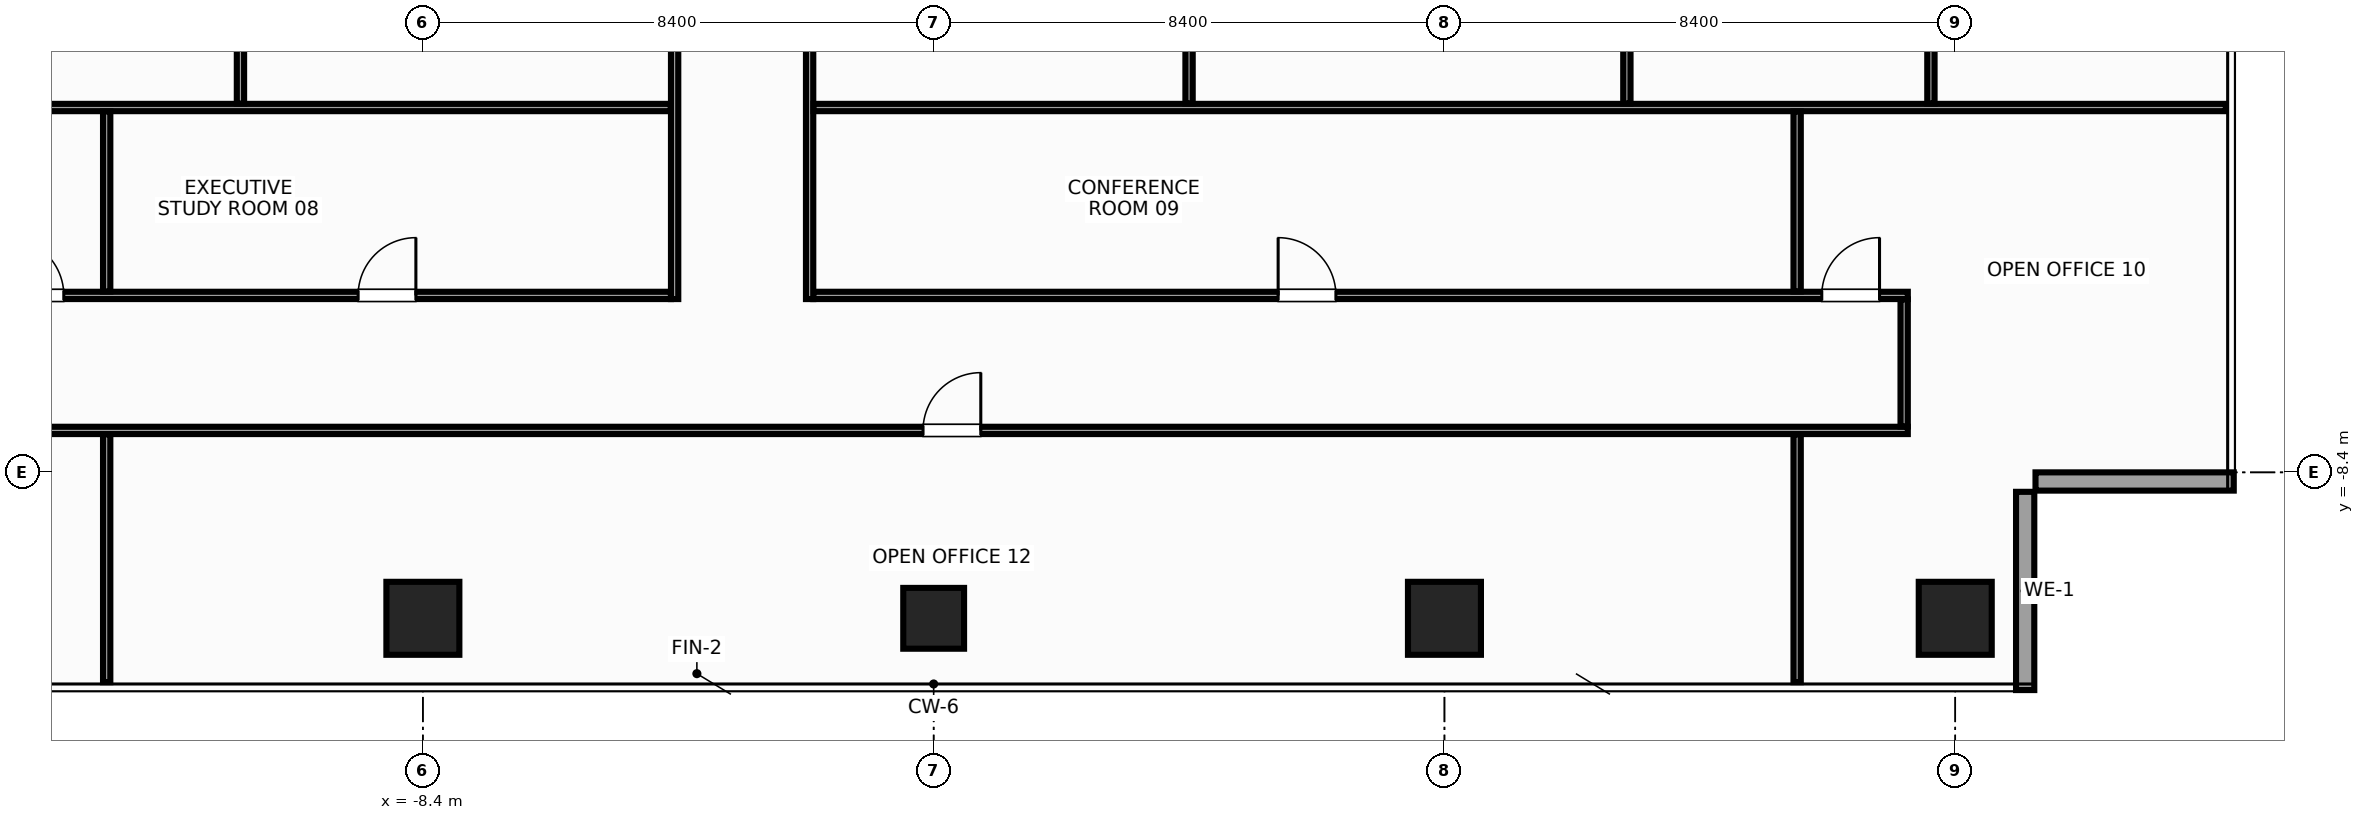
"""IFC4 building model, lengths in metres.
Left out: names, types, materials, properties, quantities, classifications, styles, units other than length and angle.
Written with IfcOpenShell. Run it as: python <this file> out.ifc"""

import sys

from ifc_helpers import new_model, si_unit, direction, frame, frame_2d, origin, origin_2d, place, context, subcontext, project, spatial, rectangle, extrude, source, transform, mapped, element, fill, save


model = new_model("IFC4")
c1 = context("Model", 3, precision=1e-05, world=origin(), true_north=direction((0.0, 1.0)))
c2 = subcontext(c1, "Body", "Model", "MODEL_VIEW")
j1 = project(units=[si_unit("LENGTHUNIT", "METRE"), si_unit("PLANEANGLEUNIT", "RADIAN")], contexts=[c1])
p1 = place(None, origin())
s1 = spatial("IfcSite", under=j1, at=p1, CompositionType="ELEMENT")
p2 = place(p1, origin())
s2 = spatial("IfcBuilding", under=s1, at=p2, CompositionType="ELEMENT")
p3 = place(p2, frame((0.0, 0.0, 275.6)))
s3 = spatial("IfcBuildingStorey", under=s2, at=p3, CompositionType="ELEMENT", Elevation=275.6)
m1 = source(origin(), c2, "Body", "SweptSolid", [
    extrude(rectangle(XDim=1.2, YDim=1.2, at=origin_2d()), origin(), (0.0, 0.0, 1.0), 3.6),
])
for number, where, z_axis, x_axis in (
    (1, (16.8, -10.8, 0.0), (0.0, 0.0, 1.0), (1.0, 0.0, 0.0)),
    (2, (-8.4, -10.8, 0.0), (0.0, 0.0, 1.0), (1.0, 0.0, 0.0)),
    (3, (8.4, -10.8, 0.0), (0.0, 0.0, 1.0), (1.0, 0.0, 0.0)),
):
    element("IfcColumn", number, at=place(p3, frame(where, z_axis=z_axis, x_axis=x_axis)), inside=s3, PredefinedType="COLUMN", context=c2, shape_type="MappedRepresentation", body=[
        mapped(m1, transform((0.0, 0.0, 0.0), x_axis=(1.0, 0.0, 0.0), y_axis=(0.0, 1.0, 0.0), z_axis=(0.0, 0.0, 1.0), scale=1.0)),
    ])
m2 = source(origin(), c2, "Body", "SweptSolid", [
    extrude(rectangle(XDim=1.0, YDim=1.0, at=origin_2d()), origin(), (0.0, 0.0, 1.0), 3.6),
])
p4 = place(p3, frame((0.0, -10.8, 0.0), z_axis=(0.0, 0.0, 1.0), x_axis=(1.0, 0.0, 0.0)))
e4 = element("IfcColumn", 4, at=p4, inside=s3, PredefinedType="COLUMN", context=c2, shape_type="MappedRepresentation", body=[
    mapped(m2, transform((0.0, 0.0, 0.0), x_axis=(1.0, 0.0, 0.0), y_axis=(0.0, 1.0, 0.0), z_axis=(0.0, 0.0, 1.0), scale=1.0)),
])
m3 = source(origin(), c2, "Body", "SweptSolid", [
    extrude(rectangle(XDim=3.26, YDim=0.3, at=frame_2d((1.63, 0.0))), origin(), (0.0, 0.0, 1.0), 2.75),
])
p5 = place(p3, frame((17.95, -11.98, 0.0), z_axis=(0.0, 0.0, 1.0), x_axis=(0.0, 1.0, 0.0)))
e5 = element("IfcWall", 5, at=p5, inside=s3, PredefinedType="STANDARD", context=c2, shape_type="MappedRepresentation", body=[
    mapped(m3, transform((0.0, 0.0, 0.0), x_axis=(1.0, 0.0, 0.0), y_axis=(0.0, 1.0, 0.0), z_axis=(0.0, 0.0, 1.0), scale=1.0)),
])
m4 = source(origin(), c2, "Body", "SweptSolid", [
    extrude(rectangle(XDim=3.26, YDim=0.3, at=frame_2d((1.63, 0.0))), origin(), (0.0, 0.0, 1.0), 2.75),
])
p6 = place(p3, frame((18.12, -8.55, 0.0), z_axis=(0.0, 0.0, 1.0), x_axis=(1.0, 0.0, 0.0)))
e6 = element("IfcWall", 6, at=p6, inside=s3, PredefinedType="STANDARD", context=c2, shape_type="MappedRepresentation", body=[
    mapped(m4, transform((0.0, 0.0, 0.0), x_axis=(1.0, 0.0, 0.0), y_axis=(0.0, 1.0, 0.0), z_axis=(0.0, 0.0, 1.0), scale=1.0)),
])
m5 = source(origin(), c2, "Body", "SweptSolid", [
    extrude(rectangle(XDim=11.7, YDim=0.12, at=frame_2d((5.85, 0.0))), origin(), (0.0, 0.0, 1.0), 2.755),
])
p7 = place(p3, frame((-16.02, -5.49, 0.0), z_axis=(0.0, 0.0, 1.0), x_axis=(1.0, 0.0, 0.0)))
e7 = element("IfcWall", 7, at=p7, inside=s3, PredefinedType="PARTITIONING", context=c2, shape_type="MappedRepresentation", body=[
    mapped(m5, transform((0.0, 0.0, 0.0), x_axis=(1.0, 0.0, 0.0), y_axis=(0.0, 1.0, 0.0), z_axis=(0.0, 0.0, 1.0), scale=1.0)),
])
p8 = place(p7, frame((6.555, 0.0, 0.0)))
e8 = element("IfcOpeningElement", 8, at=p8, cuts=e7, PredefinedType="OPENING", context=c2, shape_type="SweptSolid", body=[
    extrude(rectangle(XDim=0.95, YDim=2.15, at=frame_2d((0.475, 1.075))), frame((0.0, 0.072, 0.0), z_axis=(0.0, -1.0, 0.0), x_axis=(1.0, 0.0, 0.0)), (0.0, 0.0, 1.0), 0.144),
])
p9 = place(p7, frame((0.765, 0.0, 0.0)))
e9 = element("IfcOpeningElement", 9, at=p9, cuts=e7, PredefinedType="OPENING", context=c2, shape_type="SweptSolid", body=[
    extrude(rectangle(XDim=0.95, YDim=2.15, at=frame_2d((0.475, 1.075))), frame((0.0, 0.072, 0.0), z_axis=(0.0, -1.0, 0.0), x_axis=(1.0, 0.0, 0.0)), (0.0, 0.0, 1.0), 0.144),
])
m6 = source(origin(), c2, "Body", "SweptSolid", [
    extrude(rectangle(XDim=18.0, YDim=0.12, at=frame_2d((9.0, 0.0))), origin(), (0.0, 0.0, 1.0), 2.755),
])
p10 = place(p3, frame((-1.98, -5.49, 0.0), z_axis=(0.0, 0.0, 1.0), x_axis=(1.0, 0.0, 0.0)))
e10 = element("IfcWall", 10, at=p10, inside=s3, PredefinedType="PARTITIONING", context=c2, shape_type="MappedRepresentation", body=[
    mapped(m6, transform((0.0, 0.0, 0.0), x_axis=(1.0, 0.0, 0.0), y_axis=(0.0, 1.0, 0.0), z_axis=(0.0, 0.0, 1.0), scale=1.0)),
])
p11 = place(p10, frame((7.645, 0.0, 0.0)))
e11 = element("IfcOpeningElement", 11, at=p11, cuts=e10, PredefinedType="OPENING", context=c2, shape_type="SweptSolid", body=[
    extrude(rectangle(XDim=0.95, YDim=2.15, at=frame_2d((0.475, 1.075))), frame((0.0, 0.072, 0.0), z_axis=(0.0, -1.0, 0.0), x_axis=(1.0, 0.0, 0.0)), (0.0, 0.0, 1.0), 0.144),
])
p12 = place(p10, frame((16.585, 0.0, 0.0)))
e12 = element("IfcOpeningElement", 12, at=p12, cuts=e10, PredefinedType="OPENING", context=c2, shape_type="SweptSolid", body=[
    extrude(rectangle(XDim=0.95, YDim=2.15, at=frame_2d((0.475, 1.075))), frame((0.0, 0.072, 0.0), z_axis=(0.0, -1.0, 0.0), x_axis=(1.0, 0.0, 0.0)), (0.0, 0.0, 1.0), 0.144),
])
m7 = source(origin(), c2, "Body", "SweptSolid", [
    extrude(rectangle(XDim=32.04, YDim=0.12, at=frame_2d((16.02, 0.0))), origin(), (0.0, 0.0, 1.0), 2.755),
])
p13 = place(p3, frame((-16.02, -7.71, 0.0), z_axis=(0.0, 0.0, 1.0), x_axis=(1.0, 0.0, 0.0)))
e13 = element("IfcWall", 13, at=p13, inside=s3, PredefinedType="PARTITIONING", context=c2, shape_type="MappedRepresentation", body=[
    mapped(m7, transform((0.0, 0.0, 0.0), x_axis=(1.0, 0.0, 0.0), y_axis=(0.0, 1.0, 0.0), z_axis=(0.0, 0.0, 1.0), scale=1.0)),
])
p14 = place(p13, frame((15.845, 0.0, 0.0)))
e14 = element("IfcOpeningElement", 14, at=p14, cuts=e13, PredefinedType="OPENING", context=c2, shape_type="SweptSolid", body=[
    extrude(rectangle(XDim=0.95, YDim=2.15, at=frame_2d((0.475, 1.075))), frame((0.0, 0.072, 0.0), z_axis=(0.0, -1.0, 0.0), x_axis=(1.0, 0.0, 0.0)), (0.0, 0.0, 1.0), 0.144),
])
m8 = source(origin(), c2, "Body", "SweptSolid", [
    extrude(rectangle(XDim=13.35, YDim=0.12, at=frame_2d((6.675, 0.0))), origin(), (0.0, 0.0, 1.0), 2.655),
])
for number, where, z_axis, x_axis in (
    (15, (-4.26, -5.55, 0.0), (0.0, 0.0, 1.0), (0.0, 1.0, 0.0)),
    (16, (-2.04, -5.55, 0.0), (0.0, 0.0, 1.0), (0.0, 1.0, 0.0)),
):
    element("IfcWall", number, at=place(p3, frame(where, z_axis=z_axis, x_axis=x_axis)), inside=s3, PredefinedType="PARTITIONING", context=c2, shape_type="MappedRepresentation", body=[
        mapped(m8, transform((0.0, 0.0, 0.0), x_axis=(1.0, 0.0, 0.0), y_axis=(0.0, 1.0, 0.0), z_axis=(0.0, 0.0, 1.0), scale=1.0)),
    ])
m9 = source(origin(), c2, "Body", "SweptSolid", [
    extrude(rectangle(XDim=2.09, YDim=0.12, at=frame_2d((1.045, 0.0))), origin(), (0.0, 0.0, 1.0), 3.37),
])
p15 = place(p3, frame((15.96, -7.645, 0.0), z_axis=(0.0, 0.0, 1.0), x_axis=(0.0, 1.0, 0.0)))
e17 = element("IfcWall", 17, at=p15, inside=s3, PredefinedType="PARTITIONING", context=c2, shape_type="MappedRepresentation", body=[
    mapped(m9, transform((0.0, 0.0, 0.0), x_axis=(1.0, 0.0, 0.0), y_axis=(0.0, 1.0, 0.0), z_axis=(0.0, 0.0, 1.0), scale=1.0)),
])
m10 = source(origin(), c2, "Body", "SweptSolid", [
    extrude(rectangle(XDim=16.925, YDim=0.12, at=frame_2d((8.462, 0.0))), origin(), (0.0, 0.0, 1.0), 2.755),
])
p16 = place(p3, frame((-21.25, -2.4, 0.0), z_axis=(0.0, 0.0, 1.0), x_axis=(1.0, 0.0, 0.0)))
e18 = element("IfcWall", 18, at=p16, inside=s3, PredefinedType="PARTITIONING", context=c2, shape_type="MappedRepresentation", body=[
    mapped(m10, transform((0.0, 0.0, 0.0), x_axis=(1.0, 0.0, 0.0), y_axis=(0.0, 1.0, 0.0), z_axis=(0.0, 0.0, 1.0), scale=1.0)),
])
m11 = source(origin(), c2, "Body", "SweptSolid", [
    extrude(rectangle(XDim=23.225, YDim=0.12, at=frame_2d((11.613, 0.0))), origin(), (0.0, 0.0, 1.0), 2.755),
])
p17 = place(p3, frame((-1.975, -2.4, 0.0), z_axis=(0.0, 0.0, 1.0), x_axis=(1.0, 0.0, 0.0)))
e19 = element("IfcWall", 19, at=p17, inside=s3, PredefinedType="PARTITIONING", context=c2, shape_type="MappedRepresentation", body=[
    mapped(m11, transform((0.0, 0.0, 0.0), x_axis=(1.0, 0.0, 0.0), y_axis=(0.0, 1.0, 0.0), z_axis=(0.0, 0.0, 1.0), scale=1.0)),
])
m12 = source(origin(), c2, "Body", "SweptSolid", [
    extrude(rectangle(XDim=10.01, YDim=0.12, at=frame_2d((5.005, 0.0))), origin(), (0.0, 0.0, 1.0), 2.655),
])
for number, where, z_axis, x_axis in (
    (20, (-11.4, -2.335, 0.0), (0.0, 0.0, 1.0), (0.0, 1.0, 0.0)),
    (21, (4.2, -2.335, 0.0), (0.0, 0.0, 1.0), (0.0, 1.0, 0.0)),
    (22, (11.4, -2.335, 0.0), (0.0, 0.0, 1.0), (0.0, 1.0, 0.0)),
):
    element("IfcWall", number, at=place(p3, frame(where, z_axis=z_axis, x_axis=x_axis)), inside=s3, PredefinedType="PARTITIONING", context=c2, shape_type="MappedRepresentation", body=[
        mapped(m12, transform((0.0, 0.0, 0.0), x_axis=(1.0, 0.0, 0.0), y_axis=(0.0, 1.0, 0.0), z_axis=(0.0, 0.0, 1.0), scale=1.0)),
    ])
m13 = source(origin(), c2, "Body", "SweptSolid", [
    extrude(rectangle(XDim=1.725, YDim=0.12, at=frame_2d((0.862, 0.0))), origin(), (0.0, 0.0, 1.0), 3.37),
])
p18 = place(p3, frame((16.4, -2.335, 0.0), z_axis=(0.0, 0.0, 1.0), x_axis=(0.0, 1.0, 0.0)))
e23 = element("IfcWall", 23, at=p18, inside=s3, PredefinedType="PARTITIONING", context=c2, shape_type="MappedRepresentation", body=[
    mapped(m13, transform((0.0, 0.0, 0.0), x_axis=(1.0, 0.0, 0.0), y_axis=(0.0, 1.0, 0.0), z_axis=(0.0, 0.0, 1.0), scale=1.0)),
])
m14 = source(origin(), c2, "Body", "SweptSolid", [
    extrude(rectangle(XDim=4.075, YDim=0.12, at=frame_2d((2.038, 0.0))), origin(), (0.0, 0.0, 1.0), 2.905),
])
p19 = place(p3, frame((-13.6, -11.85, 0.0), z_axis=(0.0, 0.0, 1.0), x_axis=(0.0, 1.0, 0.0)))
e24 = element("IfcWall", 24, at=p19, inside=s3, PredefinedType="PARTITIONING", context=c2, shape_type="MappedRepresentation", body=[
    mapped(m14, transform((0.0, 0.0, 0.0), x_axis=(1.0, 0.0, 0.0), y_axis=(0.0, 1.0, 0.0), z_axis=(0.0, 0.0, 1.0), scale=1.0)),
])
m15 = source(origin(), c2, "Body", "SweptSolid", [
    extrude(rectangle(XDim=2.96, YDim=0.12, at=frame_2d((1.48, 0.0))), origin(), (0.0, 0.0, 1.0), 3.37),
])
p20 = place(p3, frame((-13.6, -5.425, 0.0), z_axis=(0.0, 0.0, 1.0), x_axis=(0.0, 1.0, 0.0)))
e25 = element("IfcWall", 25, at=p20, inside=s3, PredefinedType="PARTITIONING", context=c2, shape_type="MappedRepresentation", body=[
    mapped(m15, transform((0.0, 0.0, 0.0), x_axis=(1.0, 0.0, 0.0), y_axis=(0.0, 1.0, 0.0), z_axis=(0.0, 0.0, 1.0), scale=1.0)),
])
p21 = place(p3, frame((14.2, -11.85, 0.0), z_axis=(0.0, 0.0, 1.0), x_axis=(0.0, 1.0, 0.0)))
e26 = element("IfcWall", 26, at=p21, inside=s3, PredefinedType="PARTITIONING", context=c2, shape_type="MappedRepresentation", body=[
    mapped(m14, transform((0.0, 0.0, 0.0), x_axis=(1.0, 0.0, 0.0), y_axis=(0.0, 1.0, 0.0), z_axis=(0.0, 0.0, 1.0), scale=1.0)),
])
p22 = place(p3, frame((14.2, -5.425, 0.0), z_axis=(0.0, 0.0, 1.0), x_axis=(0.0, 1.0, 0.0)))
e27 = element("IfcWall", 27, at=p22, inside=s3, PredefinedType="PARTITIONING", context=c2, shape_type="MappedRepresentation", body=[
    mapped(m15, transform((0.0, 0.0, 0.0), x_axis=(1.0, 0.0, 0.0), y_axis=(0.0, 1.0, 0.0), z_axis=(0.0, 0.0, 1.0), scale=1.0)),
])
m16 = source(origin(), c2, "Body", "SweptSolid", [
    extrude(rectangle(XDim=0.95, YDim=2.15, at=frame_2d((0.475, 1.075))), frame((0.0, 0.025, 0.0), z_axis=(0.0, -1.0, 0.0), x_axis=(1.0, 0.0, 0.0)), (0.0, 0.0, 1.0), 0.05),
])
p23 = place(p8, origin())
e28 = element("IfcDoor", 28, at=p23, inside=s3, OperationType="SINGLE_SWING_RIGHT", PredefinedType="DOOR", context=c2, shape_type="MappedRepresentation", body=[
    mapped(m16, transform((0.0, 0.0, 0.0), x_axis=(1.0, 0.0, 0.0), y_axis=(0.0, 1.0, 0.0), z_axis=(0.0, 0.0, 1.0), scale=1.0)),
])
fill(e8, e28)
p24 = place(p11, origin())
e29 = element("IfcDoor", 29, at=p24, inside=s3, OperationType="SINGLE_SWING_LEFT", PredefinedType="DOOR", context=c2, shape_type="MappedRepresentation", body=[
    mapped(m16, transform((0.0, 0.0, 0.0), x_axis=(1.0, 0.0, 0.0), y_axis=(0.0, 1.0, 0.0), z_axis=(0.0, 0.0, 1.0), scale=1.0)),
])
fill(e11, e29)
p25 = place(p12, origin())
e30 = element("IfcDoor", 30, at=p25, inside=s3, OperationType="SINGLE_SWING_RIGHT", PredefinedType="DOOR", context=c2, shape_type="MappedRepresentation", body=[
    mapped(m16, transform((0.0, 0.0, 0.0), x_axis=(1.0, 0.0, 0.0), y_axis=(0.0, 1.0, 0.0), z_axis=(0.0, 0.0, 1.0), scale=1.0)),
])
fill(e12, e30)
p26 = place(p9, origin())
e31 = element("IfcDoor", 31, at=p26, inside=s3, OperationType="SINGLE_SWING_LEFT", PredefinedType="DOOR", context=c2, shape_type="MappedRepresentation", body=[
    mapped(m16, transform((0.0, 0.0, 0.0), x_axis=(1.0, 0.0, 0.0), y_axis=(0.0, 1.0, 0.0), z_axis=(0.0, 0.0, 1.0), scale=1.0)),
])
fill(e9, e31)
p27 = place(p14, origin())
e32 = element("IfcDoor", 32, at=p27, inside=s3, OperationType="SINGLE_SWING_RIGHT", PredefinedType="DOOR", context=c2, shape_type="MappedRepresentation", body=[
    mapped(m16, transform((0.0, 0.0, 0.0), x_axis=(1.0, 0.0, 0.0), y_axis=(0.0, 1.0, 0.0), z_axis=(0.0, 0.0, 1.0), scale=1.0)),
])
fill(e14, e32)
save(model, sys.argv[1])
